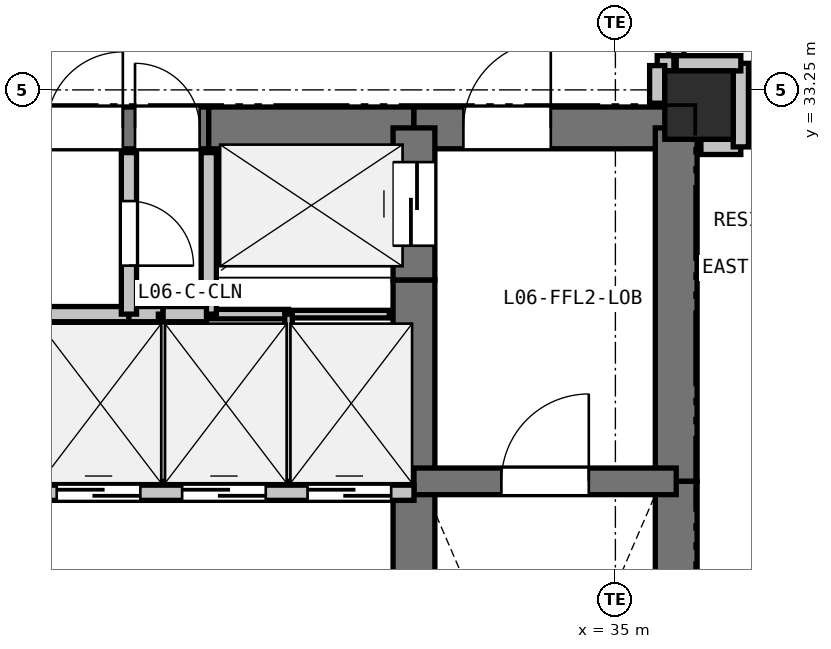
"""IFC4 building model, lengths in metres.
Left out: names, types, materials, properties, quantities, classifications, styles, units other than length and angle.
Written with IfcOpenShell. Run it as: python <this file> out.ifc"""

import sys

from ifc_helpers import new_model, si_unit, direction, frame, frame_2d, origin, origin_2d, place, context, subcontext, project, spatial, rectangle, extrude, element, fill, save


model = new_model("IFC4")
c1 = context("Model", 3, precision=1e-05, world=origin(), true_north=direction((0.0, 1.0)))
c2 = subcontext(c1, "Body", "Model", "MODEL_VIEW")
j1 = project(units=[si_unit("LENGTHUNIT", "METRE"), si_unit("PLANEANGLEUNIT", "RADIAN")], contexts=[c1])
p1 = place(None, origin())
s1 = spatial("IfcSite", under=j1, at=p1, CompositionType="ELEMENT")
p2 = place(p1, origin())
s2 = spatial("IfcBuilding", under=s1, at=p2, CompositionType="ELEMENT")
p3 = place(p2, frame((0.0, 0.0, 25.8)))
s3 = spatial("IfcBuildingStorey", under=s2, at=p3, CompositionType="ELEMENT", Elevation=25.8)
p4 = place(p3, frame((36.1, 33.05, 0.0), z_axis=(0.0, 0.0, 1.0), x_axis=(1.0, 0.0, 0.0)))
e1 = element("IfcColumn", 1, at=p4, inside=s3, PredefinedType="COLUMN", context=c2, shape_type="SweptSolid", body=[
    extrude(rectangle(XDim=0.9, YDim=0.9, at=origin_2d()), origin(), (0.0, 0.0, 1.0), 3.3),
])
p5 = place(p3, frame((27.4, 32.75, 0.0), z_axis=(0.0, 0.0, 1.0), x_axis=(1.0, 0.0, 0.0)))
e2 = element("IfcWall", 2, at=p5, inside=s3, PredefinedType="SHEAR", context=c2, shape_type="SweptSolid", body=[
    extrude(rectangle(XDim=2.25, YDim=0.55, at=frame_2d((1.125, 0.0))), origin(), (0.0, 0.0, 1.0), 3.04),
])
p6 = place(p5, frame((0.12, 0.0, 0.0)))
e3 = element("IfcOpeningElement", 3, at=p6, cuts=e2, PredefinedType="OPENING", context=c2, shape_type="SweptSolid", body=[
    extrude(rectangle(XDim=1.0, YDim=2.15, at=frame_2d((0.5, 1.075))), frame((0.0, 0.285, 0.0), z_axis=(0.0, -1.0, 0.0), x_axis=(1.0, 0.0, 0.0)), (0.0, 0.0, 1.0), 0.57),
])
p7 = place(p5, frame((1.28, 0.0, 0.0)))
e4 = element("IfcOpeningElement", 4, at=p7, cuts=e2, PredefinedType="OPENING", context=c2, shape_type="SweptSolid", body=[
    extrude(rectangle(XDim=0.85, YDim=2.1, at=frame_2d((0.425, 1.05))), frame((0.0, 0.285, 0.0), z_axis=(0.0, -1.0, 0.0), x_axis=(1.0, 0.0, 0.0)), (0.0, 0.0, 1.0), 0.57),
])
p8 = place(p3, frame((29.65, 32.75, 0.0), z_axis=(0.0, 0.0, 1.0), x_axis=(1.0, 0.0, 0.0)))
e5 = element("IfcWall", 5, at=p8, inside=s3, PredefinedType="SHEAR", context=c2, shape_type="SweptSolid", body=[
    extrude(rectangle(XDim=2.7, YDim=0.55, at=frame_2d((1.35, 0.0))), origin(), (0.0, 0.0, 1.0), 3.04),
])
p9 = place(p3, frame((32.35, 32.75, 0.0), z_axis=(0.0, 0.0, 1.0), x_axis=(1.0, 0.0, 0.0)))
e6 = element("IfcWall", 6, at=p9, inside=s3, PredefinedType="SHEAR", context=c2, shape_type="SweptSolid", body=[
    extrude(rectangle(XDim=3.45, YDim=0.55, at=frame_2d((1.725, 0.0))), origin(), (0.0, 0.0, 1.0), 3.04),
])
p10 = place(p9, frame((0.65, 0.0, 0.0)))
e7 = element("IfcOpeningElement", 7, at=p10, cuts=e6, PredefinedType="OPENING", context=c2, shape_type="SweptSolid", body=[
    extrude(rectangle(XDim=1.15, YDim=2.15, at=frame_2d((0.575, 1.075))), frame((0.0, 0.285, 0.0), z_axis=(0.0, -1.0, 0.0), x_axis=(1.0, 0.0, 0.0)), (0.0, 0.0, 1.0), 0.57),
])
p11 = place(p3, frame((35.8, 32.75, 0.0), z_axis=(0.0, 0.0, 1.0), x_axis=(0.0, -1.0, 0.0)))
e8 = element("IfcWall", 8, at=p11, inside=s3, PredefinedType="SHEAR", context=c2, shape_type="SweptSolid", body=[
    extrude(rectangle(XDim=4.65, YDim=0.55, at=frame_2d((2.325, 0.0))), origin(), (0.0, 0.0, 1.0), 3.04),
])
p12 = place(p3, frame((35.8, 28.1, 0.0), z_axis=(0.0, 0.0, 1.0), x_axis=(0.0, -1.0, 0.0)))
e9 = element("IfcWall", 9, at=p12, inside=s3, PredefinedType="SHEAR", context=c2, shape_type="SweptSolid", body=[
    extrude(rectangle(XDim=7.35, YDim=0.55, at=frame_2d((3.675, 0.0))), origin(), (0.0, 0.0, 1.0), 3.04),
])
p13 = place(p3, frame((32.35, 25.55, 0.0), z_axis=(0.0, 0.0, 1.0), x_axis=(0.0, 1.0, 0.0)))
e10 = element("IfcWall", 10, at=p13, inside=s3, PredefinedType="SHEAR", context=c2, shape_type="SweptSolid", body=[
    extrude(rectangle(XDim=2.4, YDim=0.55, at=frame_2d((1.2, 0.0))), origin(), (0.0, 0.0, 1.0), 3.04),
])
p14 = place(p3, frame((32.35, 27.95, 0.0), z_axis=(0.0, 0.0, 1.0), x_axis=(0.0, 1.0, 0.0)))
e11 = element("IfcWall", 11, at=p14, inside=s3, PredefinedType="SHEAR", context=c2, shape_type="SweptSolid", body=[
    extrude(rectangle(XDim=2.8, YDim=0.55, at=frame_2d((1.4, 0.0))), origin(), (0.0, 0.0, 1.0), 3.04),
])
p15 = place(p3, frame((32.35, 30.75, 0.0), z_axis=(0.0, 0.0, 1.0), x_axis=(0.0, 1.0, 0.0)))
e12 = element("IfcWall", 12, at=p15, inside=s3, PredefinedType="SHEAR", context=c2, shape_type="SweptSolid", body=[
    extrude(rectangle(XDim=2.0, YDim=0.55, at=frame_2d((1.0, 0.0))), origin(), (0.0, 0.0, 1.0), 3.04),
])
p16 = place(p15, frame((0.45, 0.0, 0.0)))
e13 = element("IfcOpeningElement", 13, at=p16, cuts=e12, PredefinedType="OPENING", context=c2, shape_type="SweptSolid", body=[
    extrude(rectangle(XDim=1.1, YDim=2.15, at=frame_2d((0.55, 1.075))), frame((0.0, 0.285, 0.0), z_axis=(0.0, -1.0, 0.0), x_axis=(1.0, 0.0, 0.0)), (0.0, 0.0, 1.0), 0.57),
])
p17 = place(p3, frame((32.35, 28.1, 0.0), z_axis=(0.0, 0.0, 1.0), x_axis=(1.0, 0.0, 0.0)))
e14 = element("IfcWall", 14, at=p17, inside=s3, PredefinedType="SHEAR", context=c2, shape_type="SweptSolid", body=[
    extrude(rectangle(XDim=3.45, YDim=0.35, at=frame_2d((1.725, 0.0))), origin(), (0.0, 0.0, 1.0), 3.04),
])
p18 = place(p17, frame((1.15, 0.0, 0.0)))
e15 = element("IfcOpeningElement", 15, at=p18, cuts=e14, PredefinedType="OPENING", context=c2, shape_type="SweptSolid", body=[
    extrude(rectangle(XDim=1.15, YDim=2.15, at=frame_2d((0.575, 1.075))), frame((0.0, 0.185, 0.0), z_axis=(0.0, -1.0, 0.0), x_axis=(1.0, 0.0, 0.0)), (0.0, 0.0, 1.0), 0.37),
])
p19 = place(p3, frame((27.4, 27.95, 0.0), z_axis=(0.0, 0.0, 1.0), x_axis=(1.0, 0.0, 0.0)))
e16 = element("IfcWall", 16, at=p19, inside=s3, PredefinedType="PARTITIONING", context=c2, shape_type="SweptSolid", body=[
    extrude(rectangle(XDim=4.95, YDim=0.2, at=frame_2d((2.475, 0.0))), origin(), (0.0, 0.0, 1.0), 3.04),
])
p20 = place(p19, frame((0.25, 0.0, 0.0)))
e17 = element("IfcOpeningElement", 17, at=p20, cuts=e16, PredefinedType="OPENING", context=c2, shape_type="SweptSolid", body=[
    extrude(rectangle(XDim=1.1, YDim=2.15, at=frame_2d((0.55, 1.075))), frame((0.0, 0.11, 0.0), z_axis=(0.0, -1.0, 0.0), x_axis=(1.0, 0.0, 0.0)), (0.0, 0.0, 1.0), 0.22),
])
p21 = place(p19, frame((1.9, 0.0, 0.0)))
e18 = element("IfcOpeningElement", 18, at=p21, cuts=e16, PredefinedType="OPENING", context=c2, shape_type="SweptSolid", body=[
    extrude(rectangle(XDim=1.1, YDim=2.15, at=frame_2d((0.55, 1.075))), frame((0.0, 0.11, 0.0), z_axis=(0.0, -1.0, 0.0), x_axis=(1.0, 0.0, 0.0)), (0.0, 0.0, 1.0), 0.22),
])
p22 = place(p19, frame((3.55, 0.0, 0.0)))
e19 = element("IfcOpeningElement", 19, at=p22, cuts=e16, PredefinedType="OPENING", context=c2, shape_type="SweptSolid", body=[
    extrude(rectangle(XDim=1.1, YDim=2.15, at=frame_2d((0.55, 1.075))), frame((0.0, 0.11, 0.0), z_axis=(0.0, -1.0, 0.0), x_axis=(1.0, 0.0, 0.0)), (0.0, 0.0, 1.0), 0.22),
])
p23 = place(p3, frame((32.025, 30.3, 0.0), z_axis=(0.0, 0.0, 1.0), x_axis=(-1.0, 0.0, 0.0)))
e20 = element("IfcWall", 20, at=p23, inside=s3, PredefinedType="PARTITIONING", context=c2, shape_type="SweptSolid", body=[
    extrude(rectangle(XDim=1.325, YDim=0.1, at=frame_2d((0.663, 0.0))), origin(), (0.0, 0.0, 1.0), 3.04),
])
p24 = place(p3, frame((30.7, 30.3, 0.0), z_axis=(0.0, 0.0, 1.0), x_axis=(-1.0, 0.0, 0.0)))
e21 = element("IfcWall", 21, at=p24, inside=s3, PredefinedType="PARTITIONING", context=c2, shape_type="SweptSolid", body=[
    extrude(rectangle(XDim=1.05, YDim=0.125, at=frame_2d((0.525, 0.0))), origin(), (0.0, 0.0, 1.0), 3.04),
])
p25 = place(p3, frame((29.65, 30.3, 0.0), z_axis=(0.0, 0.0, 1.0), x_axis=(0.0, 1.0, 0.0)))
e22 = element("IfcWall", 22, at=p25, inside=s3, PredefinedType="PARTITIONING", context=c2, shape_type="SweptSolid", body=[
    extrude(rectangle(XDim=2.125, YDim=0.2, at=frame_2d((1.062, 0.0))), origin(), (0.0, 0.0, 1.0), 3.04),
])
p26 = place(p3, frame((27.4, 30.3, 0.0), z_axis=(0.0, 0.0, 1.0), x_axis=(1.0, 0.0, 0.0)))
e23 = element("IfcWall", 23, at=p26, inside=s3, PredefinedType="PARTITIONING", context=c2, shape_type="SweptSolid", body=[
    extrude(rectangle(XDim=1.2, YDim=0.2, at=frame_2d((0.6, 0.0))), origin(), (0.0, 0.0, 1.0), 3.04),
])
p27 = place(p3, frame((28.6, 30.3, 0.0), z_axis=(0.0, 0.0, 1.0), x_axis=(1.0, 0.0, 0.0)))
e24 = element("IfcWall", 24, at=p27, inside=s3, PredefinedType="PARTITIONING", context=c2, shape_type="SweptSolid", body=[
    extrude(rectangle(XDim=0.45, YDim=0.2, at=frame_2d((0.225, 0.0))), origin(), (0.0, 0.0, 1.0), 3.04),
])
p28 = place(p3, frame((29.05, 30.3, 0.0), z_axis=(0.0, 0.0, 1.0), x_axis=(0.0, -1.0, 0.0)))
e25 = element("IfcWall", 25, at=p28, inside=s3, PredefinedType="PARTITIONING", context=c2, shape_type="SweptSolid", body=[
    extrude(rectangle(XDim=2.2, YDim=0.125, at=frame_2d((1.1, 0.0))), origin(), (0.0, 0.0, 1.0), 3.04),
])
p29 = place(p3, frame((29.05, 30.3, 0.0), z_axis=(0.0, 0.0, 1.0), x_axis=(1.0, 0.0, 0.0)))
e26 = element("IfcWall", 26, at=p29, inside=s3, PredefinedType="PARTITIONING", context=c2, shape_type="SweptSolid", body=[
    extrude(rectangle(XDim=0.57, YDim=0.2, at=frame_2d((0.285, 0.0))), origin(), (0.0, 0.0, 1.0), 3.04),
])
p30 = place(p3, frame((30.7, 30.3, 0.0), z_axis=(0.0, 0.0, 1.0), x_axis=(0.0, -1.0, 0.0)))
e27 = element("IfcWall", 27, at=p30, inside=s3, PredefinedType="PARTITIONING", context=c2, shape_type="SweptSolid", body=[
    extrude(rectangle(XDim=2.2, YDim=0.1, at=frame_2d((1.1, 0.0))), origin(), (0.0, 0.0, 1.0), 3.04),
])
p31 = place(p3, frame((28.6, 32.425, 0.0), z_axis=(0.0, 0.0, 1.0), x_axis=(0.0, -1.0, 0.0)))
e28 = element("IfcWall", 28, at=p31, inside=s3, PredefinedType="PARTITIONING", context=c2, shape_type="SweptSolid", body=[
    extrude(rectangle(XDim=2.125, YDim=0.2, at=frame_2d((1.062, 0.0))), origin(), (0.0, 0.0, 1.0), 3.04),
])
p32 = place(p31, frame((0.637, 0.0, 0.0)))
e29 = element("IfcOpeningElement", 29, at=p32, cuts=e28, PredefinedType="OPENING", context=c2, shape_type="SweptSolid", body=[
    extrude(rectangle(XDim=0.85, YDim=2.1, at=frame_2d((0.425, 1.05))), frame((0.0, 0.11, 0.0), z_axis=(0.0, -1.0, 0.0), x_axis=(1.0, 0.0, 0.0)), (0.0, 0.0, 1.0), 0.22),
])
p33 = place(p3, frame((35.8, 35.35, 0.0), z_axis=(0.0, 0.0, 1.0), x_axis=(0.0, -1.0, 0.0)))
e30 = element("IfcWall", 30, at=p33, inside=s3, PredefinedType="PARTITIONING", context=c2, shape_type="SweptSolid", body=[
    extrude(rectangle(XDim=1.75, YDim=0.2, at=frame_2d((0.875, 0.0))), origin(), (0.0, 0.0, 1.0), 3.04),
])
p34 = place(p33, frame((0.375, 0.0, 0.0)))
e31 = element("IfcOpeningElement", 31, at=p34, cuts=e30, PredefinedType="OPENING", context=c2, shape_type="SweptSolid", body=[
    extrude(rectangle(XDim=1.0, YDim=2.15, at=frame_2d((0.5, 1.075))), frame((0.0, 0.11, 0.0), z_axis=(0.0, -1.0, 0.0), x_axis=(1.0, 0.0, 0.0)), (0.0, 0.0, 1.0), 0.22),
])
p35 = place(p3, frame((35.77, 33.6, 0.0), z_axis=(0.0, 0.0, 1.0), x_axis=(-1.0, 0.0, 0.0)))
e32 = element("IfcWall", 32, at=p35, inside=s3, PredefinedType="PARTITIONING", context=c2, shape_type="SweptSolid", body=[
    extrude(rectangle(XDim=0.22, YDim=0.2, at=frame_2d((0.11, 0.0))), origin(), (0.0, 0.0, 1.0), 3.04),
])
p36 = place(p3, frame((35.55, 33.57, 0.0), z_axis=(0.0, 0.0, 1.0), x_axis=(0.0, -1.0, 0.0)))
e33 = element("IfcWall", 33, at=p36, inside=s3, PredefinedType="PARTITIONING", context=c2, shape_type="SweptSolid", body=[
    extrude(rectangle(XDim=0.495, YDim=0.2, at=frame_2d((0.248, 0.0))), origin(), (0.0, 0.0, 1.0), 2.488),
])
p37 = place(p3, frame((36.125, 32.5, 0.0), z_axis=(0.0, 0.0, 1.0), x_axis=(1.0, 0.0, 0.0)))
e34 = element("IfcWall", 34, at=p37, inside=s3, PredefinedType="PARTITIONING", context=c2, shape_type="SweptSolid", body=[
    extrude(rectangle(XDim=0.525, YDim=0.2, at=frame_2d((0.262, 0.0))), origin(), (0.0, 0.0, 1.0), 2.488),
])
p38 = place(p3, frame((36.65, 32.5, 0.0), z_axis=(0.0, 0.0, 1.0), x_axis=(0.0, 1.0, 0.0)))
e35 = element("IfcWall", 35, at=p38, inside=s3, PredefinedType="PARTITIONING", context=c2, shape_type="SweptSolid", body=[
    extrude(rectangle(XDim=1.1, YDim=0.2, at=frame_2d((0.55, 0.0))), origin(), (0.0, 0.0, 1.0), 2.337),
])
p39 = place(p3, frame((36.65, 33.6, 0.0), z_axis=(0.0, 0.0, 1.0), x_axis=(-1.0, 0.0, 0.0)))
e36 = element("IfcWall", 36, at=p39, inside=s3, PredefinedType="PARTITIONING", context=c2, shape_type="SweptSolid", body=[
    extrude(rectangle(XDim=0.85, YDim=0.2, at=frame_2d((0.425, 0.0))), origin(), (0.0, 0.0, 1.0), 2.337),
])
p40 = place(p20, origin())
e37 = element("IfcDoor", 37, at=p40, inside=s3, OperationType="SLIDING_TO_LEFT", PredefinedType="DOOR", context=c2, shape_type="SweptSolid", body=[
    extrude(rectangle(XDim=1.1, YDim=2.15, at=frame_2d((0.55, 1.075))), frame((0.0, 0.025, 0.0), z_axis=(0.0, -1.0, 0.0), x_axis=(1.0, 0.0, 0.0)), (0.0, 0.0, 1.0), 0.05),
])
fill(e17, e37)
p41 = place(p21, origin())
e38 = element("IfcDoor", 38, at=p41, inside=s3, OperationType="SLIDING_TO_LEFT", PredefinedType="DOOR", context=c2, shape_type="SweptSolid", body=[
    extrude(rectangle(XDim=1.1, YDim=2.15, at=frame_2d((0.55, 1.075))), frame((0.0, 0.025, 0.0), z_axis=(0.0, -1.0, 0.0), x_axis=(1.0, 0.0, 0.0)), (0.0, 0.0, 1.0), 0.05),
])
fill(e18, e38)
p42 = place(p22, origin())
e39 = element("IfcDoor", 39, at=p42, inside=s3, OperationType="SLIDING_TO_LEFT", PredefinedType="DOOR", context=c2, shape_type="SweptSolid", body=[
    extrude(rectangle(XDim=1.1, YDim=2.15, at=frame_2d((0.55, 1.075))), frame((0.0, 0.025, 0.0), z_axis=(0.0, -1.0, 0.0), x_axis=(1.0, 0.0, 0.0)), (0.0, 0.0, 1.0), 0.05),
])
fill(e19, e39)
p43 = place(p16, origin())
e40 = element("IfcDoor", 40, at=p43, inside=s3, OperationType="SLIDING_TO_LEFT", PredefinedType="DOOR", context=c2, shape_type="SweptSolid", body=[
    extrude(rectangle(XDim=1.1, YDim=2.15, at=frame_2d((0.55, 1.075))), frame((0.0, 0.025, 0.0), z_axis=(0.0, -1.0, 0.0), x_axis=(1.0, 0.0, 0.0)), (0.0, 0.0, 1.0), 0.05),
])
fill(e13, e40)
p44 = place(p18, origin())
e41 = element("IfcDoor", 41, at=p44, inside=s3, OperationType="SINGLE_SWING_RIGHT", PredefinedType="DOOR", context=c2, shape_type="SweptSolid", body=[
    extrude(rectangle(XDim=1.15, YDim=2.15, at=frame_2d((0.575, 1.075))), frame((0.0, 0.025, 0.0), z_axis=(0.0, -1.0, 0.0), x_axis=(1.0, 0.0, 0.0)), (0.0, 0.0, 1.0), 0.05),
])
fill(e15, e41)
p45 = place(p10, origin())
e42 = element("IfcDoor", 42, at=p45, inside=s3, OperationType="SINGLE_SWING_RIGHT", PredefinedType="DOOR", context=c2, shape_type="SweptSolid", body=[
    extrude(rectangle(XDim=1.15, YDim=2.15, at=frame_2d((0.575, 1.075))), frame((0.0, 0.025, 0.0), z_axis=(0.0, -1.0, 0.0), x_axis=(1.0, 0.0, 0.0)), (0.0, 0.0, 1.0), 0.05),
])
fill(e7, e42)
p46 = place(p6, origin())
e43 = element("IfcDoor", 43, at=p46, inside=s3, OperationType="SINGLE_SWING_RIGHT", PredefinedType="DOOR", context=c2, shape_type="SweptSolid", body=[
    extrude(rectangle(XDim=1.0, YDim=2.15, at=frame_2d((0.5, 1.075))), frame((0.0, 0.025, 0.0), z_axis=(0.0, -1.0, 0.0), x_axis=(1.0, 0.0, 0.0)), (0.0, 0.0, 1.0), 0.05),
])
fill(e3, e43)
p47 = place(p32, origin())
e44 = element("IfcDoor", 44, at=p47, inside=s3, OperationType="SINGLE_SWING_RIGHT", PredefinedType="DOOR", context=c2, shape_type="SweptSolid", body=[
    extrude(rectangle(XDim=0.85, YDim=2.1, at=frame_2d((0.425, 1.05))), frame((0.0, 0.025, 0.0), z_axis=(0.0, -1.0, 0.0), x_axis=(1.0, 0.0, 0.0)), (0.0, 0.0, 1.0), 0.05),
])
fill(e29, e44)
p48 = place(p7, origin())
e45 = element("IfcDoor", 45, at=p48, inside=s3, OperationType="SINGLE_SWING_LEFT", PredefinedType="DOOR", context=c2, shape_type="SweptSolid", body=[
    extrude(rectangle(XDim=0.85, YDim=2.1, at=frame_2d((0.425, 1.05))), frame((0.0, 0.025, 0.0), z_axis=(0.0, -1.0, 0.0), x_axis=(1.0, 0.0, 0.0)), (0.0, 0.0, 1.0), 0.05),
])
fill(e4, e45)
save(model, sys.argv[1])
